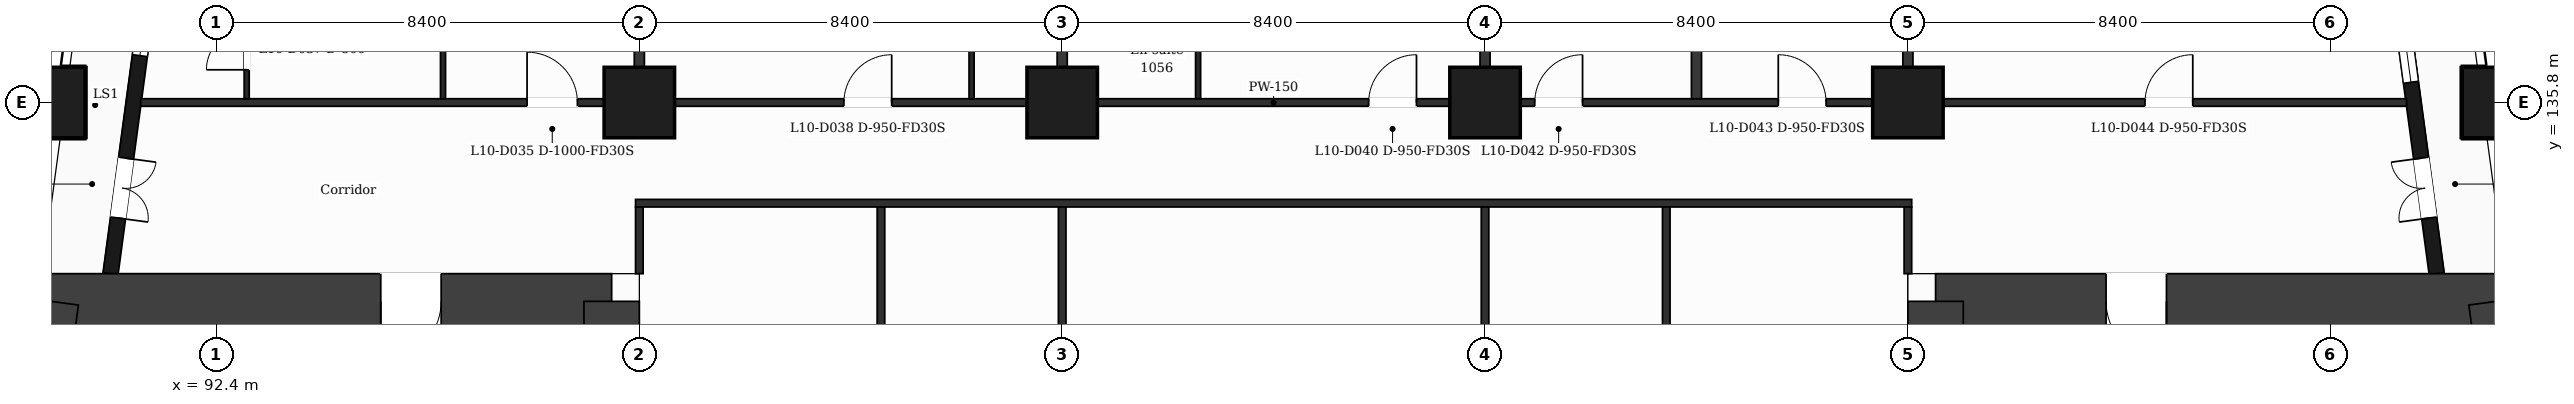
"""IFC4 building model, lengths in metres.
Left out: names, types, materials, properties, quantities, classifications, styles, units other than length and angle.
Written with IfcOpenShell. Run it as: python <this file> out.ifc"""

import sys

from ifc_helpers import new_model, si_unit, direction, frame, frame_2d, origin, origin_2d, place, context, subcontext, project, spatial, rectangle, extrude, element, fill, save


model = new_model("IFC4")
c1 = context("Model", 3, precision=1e-05, world=origin(), true_north=direction((0.0, 1.0)))
c2 = subcontext(c1, "Body", "Model", "MODEL_VIEW")
j1 = project(units=[si_unit("LENGTHUNIT", "METRE"), si_unit("PLANEANGLEUNIT", "RADIAN")], contexts=[c1])
p1 = place(None, origin())
s1 = spatial("IfcSite", under=j1, at=p1, CompositionType="ELEMENT")
p2 = place(p1, origin())
s2 = spatial("IfcBuilding", under=s1, at=p2, CompositionType="ELEMENT")
p3 = place(p2, frame((0.0, 0.0, 53.0)))
s3 = spatial("IfcBuildingStorey", under=s2, at=p3, CompositionType="ELEMENT", Elevation=53.0)
p4 = place(p3, frame((89.112, 131.85, 0.0), z_axis=(0.0, 0.0, 1.0), x_axis=(1.0, 0.0, 0.0)))
e1 = element("IfcWall", 1, at=p4, inside=s3, PredefinedType="SHEAR", context=c2, shape_type="SweptSolid", body=[
    extrude(rectangle(XDim=11.138, YDim=1.1, at=frame_2d((5.569, 0.0))), origin(), (0.0, 0.0, 1.0), 3.5),
])
p5 = place(p4, frame((6.552, 0.0, 0.0)))
e2 = element("IfcOpeningElement", 2, at=p5, cuts=e1, PredefinedType="OPENING", context=c2, shape_type="SweptSolid", body=[
    extrude(rectangle(XDim=1.2, YDim=2.1, at=frame_2d((0.6, 1.05))), frame((0.0, 0.56, 0.0), z_axis=(0.0, -1.0, 0.0), x_axis=(1.0, 0.0, 0.0)), (0.0, 0.0, 1.0), 1.12),
])
p6 = place(p3, frame((100.25, 131.85, 0.0), z_axis=(0.0, 0.0, 1.0), x_axis=(0.0, -1.0, 0.0)))
e3 = element("IfcWall", 3, at=p6, inside=s3, PredefinedType="SHEAR", context=c2, shape_type="SweptSolid", body=[
    extrude(rectangle(XDim=20.9, YDim=1.1, at=frame_2d((10.45, 0.0))), origin(), (0.0, 0.0, 1.0), 3.5),
])
p7 = place(p6, frame((7.7, 0.0, 0.0)))
e4 = element("IfcOpeningElement", 4, at=p7, cuts=e3, PredefinedType="OPENING", context=c2, shape_type="SweptSolid", body=[
    extrude(rectangle(XDim=1.4, YDim=2.1, at=frame_2d((0.7, 1.05))), frame((0.0, 0.56, 0.0), z_axis=(0.0, -1.0, 0.0), x_axis=(1.0, 0.0, 0.0)), (0.0, 0.0, 1.0), 1.12),
])
p8 = place(p3, frame((86.298, 110.95, 0.0), z_axis=(0.0, 0.0, 1.0), x_axis=(0.133400422634, 0.99106222168, 0.0)))
e5 = element("IfcWall", 5, at=p8, inside=s3, PredefinedType="SHEAR", context=c2, shape_type="SweptSolid", body=[
    extrude(rectangle(XDim=21.089, YDim=1.1, at=frame_2d((10.544, 0.0))), origin(), (0.0, 0.0, 1.0), 3.5),
])
p9 = place(p3, frame((126.55, 131.85, 0.0), z_axis=(0.0, 0.0, 1.0), x_axis=(1.0, 0.0, 0.0)))
e6 = element("IfcWall", 6, at=p9, inside=s3, PredefinedType="SHEAR", context=c2, shape_type="SweptSolid", body=[
    extrude(rectangle(XDim=11.138, YDim=1.1, at=frame_2d((5.569, 0.0))), origin(), (0.0, 0.0, 1.0), 3.5),
])
p10 = place(p9, frame((3.386, 0.0, 0.0)))
e7 = element("IfcOpeningElement", 7, at=p10, cuts=e6, PredefinedType="OPENING", context=c2, shape_type="SweptSolid", body=[
    extrude(rectangle(XDim=1.2, YDim=2.1, at=frame_2d((0.6, 1.05))), frame((0.0, 0.56, 0.0), z_axis=(0.0, -1.0, 0.0), x_axis=(1.0, 0.0, 0.0)), (0.0, 0.0, 1.0), 1.12),
])
p11 = place(p3, frame((137.688, 131.85, 0.0), z_axis=(0.0, 0.0, 1.0), x_axis=(0.133411793472, -0.991060691059, 0.0)))
e8 = element("IfcWall", 8, at=p11, inside=s3, PredefinedType="SHEAR", context=c2, shape_type="SweptSolid", body=[
    extrude(rectangle(XDim=21.089, YDim=1.1, at=frame_2d((10.544, 0.0))), origin(), (0.0, 0.0, 1.0), 3.5),
])
p12 = place(p3, frame((126.55, 110.95, 0.0), z_axis=(0.0, 0.0, 1.0), x_axis=(0.0, 1.0, 0.0)))
e9 = element("IfcWall", 9, at=p12, inside=s3, PredefinedType="SHEAR", context=c2, shape_type="SweptSolid", body=[
    extrude(rectangle(XDim=20.9, YDim=1.1, at=frame_2d((10.45, 0.0))), origin(), (0.0, 0.0, 1.0), 3.5),
])
p13 = place(p12, frame((11.8, 0.0, 0.0)))
e10 = element("IfcOpeningElement", 10, at=p13, cuts=e9, PredefinedType="OPENING", context=c2, shape_type="SweptSolid", body=[
    extrude(rectangle(XDim=1.4, YDim=2.1, at=frame_2d((0.7, 1.05))), frame((0.0, 0.56, 0.0), z_axis=(0.0, -1.0, 0.0), x_axis=(1.0, 0.0, 0.0)), (0.0, 0.0, 1.0), 1.12),
])
for number, where, z_axis, x_axis in (
    (11, (100.8, 135.8, 0.0), (0.0, 0.0, 1.0), (1.0, 0.0, 0.0)),
    (12, (109.2, 135.8, 0.0), (0.0, 0.0, 1.0), (1.0, 0.0, 0.0)),
    (13, (117.6, 135.8, 0.0), (0.0, 0.0, 1.0), (1.0, 0.0, 0.0)),
    (14, (126.0, 135.8, 0.0), (0.0, 0.0, 1.0), (1.0, 0.0, 0.0)),
    (15, (89.088, 135.8, 0.0), (0.0, 0.0, 1.0), (1.0, 0.0, 0.0)),
    (16, (137.711, 135.8, 0.0), (0.0, 0.0, 1.0), (1.0, 0.0, 0.0)),
):
    element("IfcColumn", number, at=place(p3, frame(where, z_axis=z_axis, x_axis=x_axis)), inside=s3, PredefinedType="COLUMN", context=c2, shape_type="SweptSolid", body=[
        extrude(rectangle(XDim=1.4, YDim=1.4, at=origin_2d()), origin(), (0.0, 0.0, 1.0), 3.5),
    ])
p14 = place(p3, frame((136.504, 132.4, 0.0), z_axis=(0.0, 0.0, 1.0), x_axis=(-0.133399697462, 0.99106231929, 0.0)))
e17 = element("IfcWall", 17, at=p14, inside=s3, PredefinedType="SOLIDWALL", context=c2, shape_type="SweptSolid", body=[
    extrude(rectangle(XDim=6.74, YDim=0.3, at=frame_2d((3.37, 0.0))), origin(), (0.0, 0.0, 1.0), 3.18),
])
p15 = place(p14, frame((1.115, 0.0, 0.0)))
e18 = element("IfcOpeningElement", 18, at=p15, cuts=e17, PredefinedType="OPENING", context=c2, shape_type="SweptSolid", body=[
    extrude(rectangle(XDim=1.2, YDim=2.4, at=frame_2d((0.6, 1.2))), frame((0.0, 0.16, 0.0), z_axis=(0.0, -1.0, 0.0), x_axis=(1.0, 0.0, 0.0)), (0.0, 0.0, 1.0), 0.32),
])
p16 = place(p14, frame((3.835, 0.0, 0.9)))
e19 = element("IfcOpeningElement", 19, at=p16, cuts=e17, PredefinedType="OPENING", context=c2, shape_type="SweptSolid", body=[
    extrude(rectangle(XDim=2.4, YDim=2.1, at=frame_2d((1.2, 1.05))), frame((0.0, 0.16, 0.0), z_axis=(0.0, -1.0, 0.0), x_axis=(1.0, 0.0, 0.0)), (0.0, 0.0, 1.0), 0.32),
])
p17 = place(p3, frame((91.177, 138.95, 0.0), z_axis=(0.0, 0.0, 1.0), x_axis=(-0.133426664613, -0.991058689065, 0.0)))
e20 = element("IfcWall", 20, at=p17, inside=s3, PredefinedType="SOLIDWALL", context=c2, shape_type="SweptSolid", body=[
    extrude(rectangle(XDim=6.609, YDim=0.3, at=frame_2d((3.305, 0.0))), origin(), (0.0, 0.0, 1.0), 3.18),
])
p18 = place(p17, frame((1.039, 0.0, 0.9)))
e21 = element("IfcOpeningElement", 21, at=p18, cuts=e20, PredefinedType="OPENING", context=c2, shape_type="SweptSolid", body=[
    extrude(rectangle(XDim=1.2, YDim=2.1, at=frame_2d((0.6, 1.05))), frame((0.0, 0.16, 0.0), z_axis=(0.0, -1.0, 0.0), x_axis=(1.0, 0.0, 0.0)), (0.0, 0.0, 1.0), 0.32),
])
p19 = place(p17, frame((4.294, 0.0, 0.0)))
e22 = element("IfcOpeningElement", 22, at=p19, cuts=e20, PredefinedType="OPENING", context=c2, shape_type="SweptSolid", body=[
    extrude(rectangle(XDim=1.2, YDim=2.4, at=frame_2d((0.6, 1.2))), frame((0.0, 0.16, 0.0), z_axis=(0.0, -1.0, 0.0), x_axis=(1.0, 0.0, 0.0)), (0.0, 0.0, 1.0), 0.32),
])
p20 = place(p3, frame((100.725, 133.8, 0.0), z_axis=(0.0, 0.0, 1.0), x_axis=(1.0, 0.0, 0.0)))
e23 = element("IfcWall", 23, at=p20, inside=s3, PredefinedType="PARTITIONING", context=c2, shape_type="SweptSolid", body=[
    extrude(rectangle(XDim=25.35, YDim=0.15, at=frame_2d((12.675, 0.0))), origin(), (0.0, 0.0, 1.0), 3.18),
])
p21 = place(p3, frame((90.895, 135.8, 0.0), z_axis=(0.0, 0.0, 1.0), x_axis=(1.0, 0.0, 0.0)))
e24 = element("IfcWall", 24, at=p21, inside=s3, PredefinedType="PARTITIONING", context=c2, shape_type="SweptSolid", body=[
    extrude(rectangle(XDim=45.011, YDim=0.15, at=frame_2d((22.505, 0.0))), origin(), (0.0, 0.0, 1.0), 3.18),
])
p22 = place(p21, frame((7.675, 0.0, 0.0)))
e25 = element("IfcOpeningElement", 25, at=p22, cuts=e24, PredefinedType="OPENING", context=c2, shape_type="SweptSolid", body=[
    extrude(rectangle(XDim=1.0, YDim=2.1, at=frame_2d((0.5, 1.05))), frame((0.0, 0.085, 0.0), z_axis=(0.0, -1.0, 0.0), x_axis=(1.0, 0.0, 0.0)), (0.0, 0.0, 1.0), 0.17),
])
p23 = place(p21, frame((13.969, 0.0, 0.0)))
e26 = element("IfcOpeningElement", 26, at=p23, cuts=e24, PredefinedType="OPENING", context=c2, shape_type="SweptSolid", body=[
    extrude(rectangle(XDim=0.95, YDim=2.1, at=frame_2d((0.475, 1.05))), frame((0.0, 0.085, 0.0), z_axis=(0.0, -1.0, 0.0), x_axis=(1.0, 0.0, 0.0)), (0.0, 0.0, 1.0), 0.17),
])
p24 = place(p21, frame((24.393, 0.0, 0.0)))
e27 = element("IfcOpeningElement", 27, at=p24, cuts=e24, PredefinedType="OPENING", context=c2, shape_type="SweptSolid", body=[
    extrude(rectangle(XDim=0.95, YDim=2.1, at=frame_2d((0.475, 1.05))), frame((0.0, 0.085, 0.0), z_axis=(0.0, -1.0, 0.0), x_axis=(1.0, 0.0, 0.0)), (0.0, 0.0, 1.0), 0.17),
])
p25 = place(p21, frame((27.692, 0.0, 0.0)))
e28 = element("IfcOpeningElement", 28, at=p25, cuts=e24, PredefinedType="OPENING", context=c2, shape_type="SweptSolid", body=[
    extrude(rectangle(XDim=0.95, YDim=2.1, at=frame_2d((0.475, 1.05))), frame((0.0, 0.085, 0.0), z_axis=(0.0, -1.0, 0.0), x_axis=(1.0, 0.0, 0.0)), (0.0, 0.0, 1.0), 0.17),
])
p26 = place(p21, frame((32.531, 0.0, 0.0)))
e29 = element("IfcOpeningElement", 29, at=p26, cuts=e24, PredefinedType="OPENING", context=c2, shape_type="SweptSolid", body=[
    extrude(rectangle(XDim=0.95, YDim=2.1, at=frame_2d((0.475, 1.05))), frame((0.0, 0.085, 0.0), z_axis=(0.0, -1.0, 0.0), x_axis=(1.0, 0.0, 0.0)), (0.0, 0.0, 1.0), 0.17),
])
p27 = place(p21, frame((39.814, 0.0, 0.0)))
e30 = element("IfcOpeningElement", 30, at=p27, cuts=e24, PredefinedType="OPENING", context=c2, shape_type="SweptSolid", body=[
    extrude(rectangle(XDim=0.95, YDim=2.1, at=frame_2d((0.475, 1.05))), frame((0.0, 0.085, 0.0), z_axis=(0.0, -1.0, 0.0), x_axis=(1.0, 0.0, 0.0)), (0.0, 0.0, 1.0), 0.17),
])
p28 = place(p3, frame((93.0, 135.875, 0.0), z_axis=(0.0, 0.0, 1.0), x_axis=(0.0, 1.0, 0.0)))
e31 = element("IfcWall", 31, at=p28, inside=s3, PredefinedType="PARTITIONING", context=c2, shape_type="SweptSolid", body=[
    extrude(rectangle(XDim=2.575, YDim=0.1, at=frame_2d((1.288, 0.0))), origin(), (0.0, 0.0, 1.0), 3.18),
])
p29 = place(p28, frame((0.575, 0.0, 0.0)))
e32 = element("IfcOpeningElement", 32, at=p29, cuts=e31, PredefinedType="OPENING", context=c2, shape_type="SweptSolid", body=[
    extrude(rectangle(XDim=0.8, YDim=2.1, at=frame_2d((0.4, 1.05))), frame((0.0, 0.06, 0.0), z_axis=(0.0, -1.0, 0.0), x_axis=(1.0, 0.0, 0.0)), (0.0, 0.0, 1.0), 0.12),
])
p30 = place(p3, frame((96.9, 135.875, 0.0), z_axis=(0.0, 0.0, 1.0), x_axis=(0.0, 1.0, 0.0)))
e33 = element("IfcWall", 33, at=p30, inside=s3, PredefinedType="PARTITIONING", context=c2, shape_type="SweptSolid", body=[
    extrude(rectangle(XDim=7.135, YDim=0.1, at=frame_2d((3.567, 0.0))), origin(), (0.0, 0.0, 1.0), 3.18),
])
p31 = place(p30, frame((5.29, 0.0, 0.0)))
e34 = element("IfcOpeningElement", 34, at=p31, cuts=e33, PredefinedType="OPENING", context=c2, shape_type="SweptSolid", body=[
    extrude(rectangle(XDim=0.9, YDim=2.1, at=frame_2d((0.45, 1.05))), frame((0.0, 0.06, 0.0), z_axis=(0.0, -1.0, 0.0), x_axis=(1.0, 0.0, 0.0)), (0.0, 0.0, 1.0), 0.12),
])
p32 = place(p3, frame((100.8, 135.875, 0.0), z_axis=(0.0, 0.0, 1.0), x_axis=(0.0, 1.0, 0.0)))
e35 = element("IfcWall", 35, at=p32, inside=s3, PredefinedType="PARTITIONING", context=c2, shape_type="SweptSolid", body=[
    extrude(rectangle(XDim=7.135, YDim=0.2, at=frame_2d((3.567, 0.0))), origin(), (0.0, 0.0, 1.0), 3.18),
])
p33 = place(p3, frame((100.8, 132.4, 0.0), z_axis=(0.0, 0.0, 1.0), x_axis=(0.0, 1.0, 0.0)))
e36 = element("IfcWall", 36, at=p33, inside=s3, PredefinedType="PARTITIONING", context=c2, shape_type="SweptSolid", body=[
    extrude(rectangle(XDim=1.325, YDim=0.15, at=frame_2d((0.663, 0.0))), origin(), (0.0, 0.0, 1.0), 3.18),
])
p34 = place(p3, frame((105.6, 124.525, 0.0), z_axis=(0.0, 0.0, 1.0), x_axis=(0.0, 1.0, 0.0)))
e37 = element("IfcWall", 37, at=p34, inside=s3, PredefinedType="PARTITIONING", context=c2, shape_type="SweptSolid", body=[
    extrude(rectangle(XDim=9.2, YDim=0.15, at=frame_2d((4.6, 0.0))), origin(), (0.0, 0.0, 1.0), 3.18),
])
p35 = place(p34, frame((3.335, 0.0, 0.0)))
e38 = element("IfcOpeningElement", 38, at=p35, cuts=e37, PredefinedType="OPENING", context=c2, shape_type="SweptSolid", body=[
    extrude(rectangle(XDim=1.0, YDim=2.1, at=frame_2d((0.5, 1.05))), frame((0.0, 0.085, 0.0), z_axis=(0.0, -1.0, 0.0), x_axis=(1.0, 0.0, 0.0)), (0.0, 0.0, 1.0), 0.17),
])
p36 = place(p3, frame((107.4, 135.875, 0.0), z_axis=(0.0, 0.0, 1.0), x_axis=(0.0, 1.0, 0.0)))
e39 = element("IfcWall", 39, at=p36, inside=s3, PredefinedType="PARTITIONING", context=c2, shape_type="SweptSolid", body=[
    extrude(rectangle(XDim=2.575, YDim=0.1, at=frame_2d((1.288, 0.0))), origin(), (0.0, 0.0, 1.0), 3.18),
])
p37 = place(p36, frame((0.995, 0.0, 0.0)))
e40 = element("IfcOpeningElement", 40, at=p37, cuts=e39, PredefinedType="OPENING", context=c2, shape_type="SweptSolid", body=[
    extrude(rectangle(XDim=0.8, YDim=2.1, at=frame_2d((0.4, 1.05))), frame((0.0, 0.06, 0.0), z_axis=(0.0, -1.0, 0.0), x_axis=(1.0, 0.0, 0.0)), (0.0, 0.0, 1.0), 0.12),
])
p38 = place(p3, frame((109.2, 135.875, 0.0), z_axis=(0.0, 0.0, 1.0), x_axis=(0.0, 1.0, 0.0)))
e41 = element("IfcWall", 41, at=p38, inside=s3, PredefinedType="PARTITIONING", context=c2, shape_type="SweptSolid", body=[
    extrude(rectangle(XDim=7.135, YDim=0.2, at=frame_2d((3.567, 0.0))), origin(), (0.0, 0.0, 1.0), 3.18),
])
p39 = place(p3, frame((109.2, 124.525, 0.0), z_axis=(0.0, 0.0, 1.0), x_axis=(0.0, 1.0, 0.0)))
e42 = element("IfcWall", 42, at=p39, inside=s3, PredefinedType="PARTITIONING", context=c2, shape_type="SweptSolid", body=[
    extrude(rectangle(XDim=9.2, YDim=0.15, at=frame_2d((4.6, 0.0))), origin(), (0.0, 0.0, 1.0), 3.18),
])
p40 = place(p39, frame((4.865, 0.0, 0.0)))
e43 = element("IfcOpeningElement", 43, at=p40, cuts=e42, PredefinedType="OPENING", context=c2, shape_type="SweptSolid", body=[
    extrude(rectangle(XDim=1.0, YDim=2.1, at=frame_2d((0.5, 1.05))), frame((0.0, 0.085, 0.0), z_axis=(0.0, -1.0, 0.0), x_axis=(1.0, 0.0, 0.0)), (0.0, 0.0, 1.0), 0.17),
])
p41 = place(p3, frame((111.9, 135.875, 0.0), z_axis=(0.0, 0.0, 1.0), x_axis=(0.0, 1.0, 0.0)))
e44 = element("IfcWall", 44, at=p41, inside=s3, PredefinedType="PARTITIONING", context=c2, shape_type="SweptSolid", body=[
    extrude(rectangle(XDim=2.275, YDim=0.1, at=frame_2d((1.137, 0.0))), origin(), (0.0, 0.0, 1.0), 3.18),
])
p42 = place(p3, frame((117.6, 135.875, 0.0), z_axis=(0.0, 0.0, 1.0), x_axis=(0.0, 1.0, 0.0)))
e45 = element("IfcWall", 45, at=p42, inside=s3, PredefinedType="PARTITIONING", context=c2, shape_type="SweptSolid", body=[
    extrude(rectangle(XDim=7.135, YDim=0.2, at=frame_2d((3.567, 0.0))), origin(), (0.0, 0.0, 1.0), 3.18),
])
p43 = place(p3, frame((117.6, 124.525, 0.0), z_axis=(0.0, 0.0, 1.0), x_axis=(0.0, 1.0, 0.0)))
e46 = element("IfcWall", 46, at=p43, inside=s3, PredefinedType="PARTITIONING", context=c2, shape_type="SweptSolid", body=[
    extrude(rectangle(XDim=9.2, YDim=0.15, at=frame_2d((4.6, 0.0))), origin(), (0.0, 0.0, 1.0), 3.18),
])
p44 = place(p3, frame((121.2, 124.525, 0.0), z_axis=(0.0, 0.0, 1.0), x_axis=(0.0, 1.0, 0.0)))
e47 = element("IfcWall", 47, at=p44, inside=s3, PredefinedType="PARTITIONING", context=c2, shape_type="SweptSolid", body=[
    extrude(rectangle(XDim=9.2, YDim=0.15, at=frame_2d((4.6, 0.0))), origin(), (0.0, 0.0, 1.0), 3.18),
])
p45 = place(p44, frame((2.187, 0.0, 0.0)))
e48 = element("IfcOpeningElement", 48, at=p45, cuts=e47, PredefinedType="OPENING", context=c2, shape_type="SweptSolid", body=[
    extrude(rectangle(XDim=1.0, YDim=2.1, at=frame_2d((0.5, 1.05))), frame((0.0, 0.085, 0.0), z_axis=(0.0, -1.0, 0.0), x_axis=(1.0, 0.0, 0.0)), (0.0, 0.0, 1.0), 0.17),
])
for number, where, z_axis, x_axis in (
    (49, (121.8, 135.875, 0.0), (0.0, 0.0, 1.0), (0.0, 1.0, 0.0)),
    (50, (126.0, 135.875, 0.0), (0.0, 0.0, 1.0), (0.0, 1.0, 0.0)),
):
    element("IfcWall", number, at=place(p3, frame(where, z_axis=z_axis, x_axis=x_axis)), inside=s3, PredefinedType="PARTITIONING", context=c2, shape_type="SweptSolid", body=[
        extrude(rectangle(XDim=7.135, YDim=0.2, at=frame_2d((3.567, 0.0))), origin(), (0.0, 0.0, 1.0), 3.18),
    ])
p46 = place(p3, frame((126.0, 132.4, 0.0), z_axis=(0.0, 0.0, 1.0), x_axis=(0.0, 1.0, 0.0)))
e51 = element("IfcWall", 51, at=p46, inside=s3, PredefinedType="PARTITIONING", context=c2, shape_type="SweptSolid", body=[
    extrude(rectangle(XDim=1.325, YDim=0.15, at=frame_2d((0.663, 0.0))), origin(), (0.0, 0.0, 1.0), 3.18),
])
p47 = place(p15, origin())
e52 = element("IfcDoor", 52, at=p47, inside=s3, OperationType="DOUBLE_DOOR_SINGLE_SWING", PredefinedType="DOOR", context=c2, shape_type="SweptSolid", body=[
    extrude(rectangle(XDim=1.2, YDim=2.4, at=frame_2d((0.6, 1.2))), frame((0.0, 0.025, 0.0), z_axis=(0.0, -1.0, 0.0), x_axis=(1.0, 0.0, 0.0)), (0.0, 0.0, 1.0), 0.05),
])
fill(e18, e52)
p48 = place(p16, origin())
e53 = element("IfcWindow", 53, at=p48, inside=s3, PartitioningType="SINGLE_PANEL", PredefinedType="WINDOW", context=c2, shape_type="SweptSolid", body=[
    extrude(rectangle(XDim=2.4, YDim=2.1, at=frame_2d((1.2, 1.05))), frame((0.0, 0.03, 0.0), z_axis=(0.0, -1.0, 0.0), x_axis=(1.0, 0.0, 0.0)), (0.0, 0.0, 1.0), 0.06),
])
fill(e19, e53)
p49 = place(p18, origin())
e54 = element("IfcWindow", 54, at=p49, inside=s3, PartitioningType="SINGLE_PANEL", PredefinedType="WINDOW", context=c2, shape_type="SweptSolid", body=[
    extrude(rectangle(XDim=1.2, YDim=2.1, at=frame_2d((0.6, 1.05))), frame((0.0, 0.03, 0.0), z_axis=(0.0, -1.0, 0.0), x_axis=(1.0, 0.0, 0.0)), (0.0, 0.0, 1.0), 0.06),
])
fill(e21, e54)
p50 = place(p19, origin())
e55 = element("IfcDoor", 55, at=p50, inside=s3, OperationType="DOUBLE_DOOR_SINGLE_SWING", PredefinedType="DOOR", context=c2, shape_type="SweptSolid", body=[
    extrude(rectangle(XDim=1.2, YDim=2.4, at=frame_2d((0.6, 1.2))), frame((0.0, 0.025, 0.0), z_axis=(0.0, -1.0, 0.0), x_axis=(1.0, 0.0, 0.0)), (0.0, 0.0, 1.0), 0.05),
])
fill(e22, e55)
p51 = place(p22, origin())
e56 = element("IfcDoor", 56, at=p51, inside=s3, OperationType="SINGLE_SWING_LEFT", PredefinedType="DOOR", context=c2, shape_type="SweptSolid", body=[
    extrude(rectangle(XDim=1.0, YDim=2.1, at=frame_2d((0.5, 1.05))), frame((0.0, 0.025, 0.0), z_axis=(0.0, -1.0, 0.0), x_axis=(1.0, 0.0, 0.0)), (0.0, 0.0, 1.0), 0.05),
])
fill(e25, e56)
p52 = place(p29, origin())
e57 = element("IfcDoor", 57, at=p52, inside=s3, OperationType="SINGLE_SWING_LEFT", PredefinedType="DOOR", context=c2, shape_type="SweptSolid", body=[
    extrude(rectangle(XDim=0.8, YDim=2.1, at=frame_2d((0.4, 1.05))), frame((0.0, 0.025, 0.0), z_axis=(0.0, -1.0, 0.0), x_axis=(1.0, 0.0, 0.0)), (0.0, 0.0, 1.0), 0.05),
])
fill(e32, e57)
p53 = place(p23, origin())
e58 = element("IfcDoor", 58, at=p53, inside=s3, OperationType="SINGLE_SWING_RIGHT", PredefinedType="DOOR", context=c2, shape_type="SweptSolid", body=[
    extrude(rectangle(XDim=0.95, YDim=2.1, at=frame_2d((0.475, 1.05))), frame((0.0, 0.025, 0.0), z_axis=(0.0, -1.0, 0.0), x_axis=(1.0, 0.0, 0.0)), (0.0, 0.0, 1.0), 0.05),
])
fill(e26, e58)
p54 = place(p24, origin())
e59 = element("IfcDoor", 59, at=p54, inside=s3, OperationType="SINGLE_SWING_RIGHT", PredefinedType="DOOR", context=c2, shape_type="SweptSolid", body=[
    extrude(rectangle(XDim=0.95, YDim=2.1, at=frame_2d((0.475, 1.05))), frame((0.0, 0.025, 0.0), z_axis=(0.0, -1.0, 0.0), x_axis=(1.0, 0.0, 0.0)), (0.0, 0.0, 1.0), 0.05),
])
fill(e27, e59)
p55 = place(p25, origin())
e60 = element("IfcDoor", 60, at=p55, inside=s3, OperationType="SINGLE_SWING_RIGHT", PredefinedType="DOOR", context=c2, shape_type="SweptSolid", body=[
    extrude(rectangle(XDim=0.95, YDim=2.1, at=frame_2d((0.475, 1.05))), frame((0.0, 0.025, 0.0), z_axis=(0.0, -1.0, 0.0), x_axis=(1.0, 0.0, 0.0)), (0.0, 0.0, 1.0), 0.05),
])
fill(e28, e60)
p56 = place(p26, origin())
e61 = element("IfcDoor", 61, at=p56, inside=s3, OperationType="SINGLE_SWING_LEFT", PredefinedType="DOOR", context=c2, shape_type="SweptSolid", body=[
    extrude(rectangle(XDim=0.95, YDim=2.1, at=frame_2d((0.475, 1.05))), frame((0.0, 0.025, 0.0), z_axis=(0.0, -1.0, 0.0), x_axis=(1.0, 0.0, 0.0)), (0.0, 0.0, 1.0), 0.05),
])
fill(e29, e61)
p57 = place(p27, origin())
e62 = element("IfcDoor", 62, at=p57, inside=s3, OperationType="SINGLE_SWING_RIGHT", PredefinedType="DOOR", context=c2, shape_type="SweptSolid", body=[
    extrude(rectangle(XDim=0.95, YDim=2.1, at=frame_2d((0.475, 1.05))), frame((0.0, 0.025, 0.0), z_axis=(0.0, -1.0, 0.0), x_axis=(1.0, 0.0, 0.0)), (0.0, 0.0, 1.0), 0.05),
])
fill(e30, e62)
p58 = place(p5, origin())
e63 = element("IfcDoor", 63, at=p58, inside=s3, OperationType="SINGLE_SWING_LEFT", PredefinedType="DOOR", context=c2, shape_type="SweptSolid", body=[
    extrude(rectangle(XDim=1.2, YDim=2.1, at=frame_2d((0.6, 1.05))), frame((0.0, 0.025, 0.0), z_axis=(0.0, -1.0, 0.0), x_axis=(1.0, 0.0, 0.0)), (0.0, 0.0, 1.0), 0.05),
])
fill(e2, e63)
p59 = place(p10, origin())
e64 = element("IfcDoor", 64, at=p59, inside=s3, OperationType="SINGLE_SWING_RIGHT", PredefinedType="DOOR", context=c2, shape_type="SweptSolid", body=[
    extrude(rectangle(XDim=1.2, YDim=2.1, at=frame_2d((0.6, 1.05))), frame((0.0, 0.025, 0.0), z_axis=(0.0, -1.0, 0.0), x_axis=(1.0, 0.0, 0.0)), (0.0, 0.0, 1.0), 0.05),
])
fill(e7, e64)
save(model, sys.argv[1])
